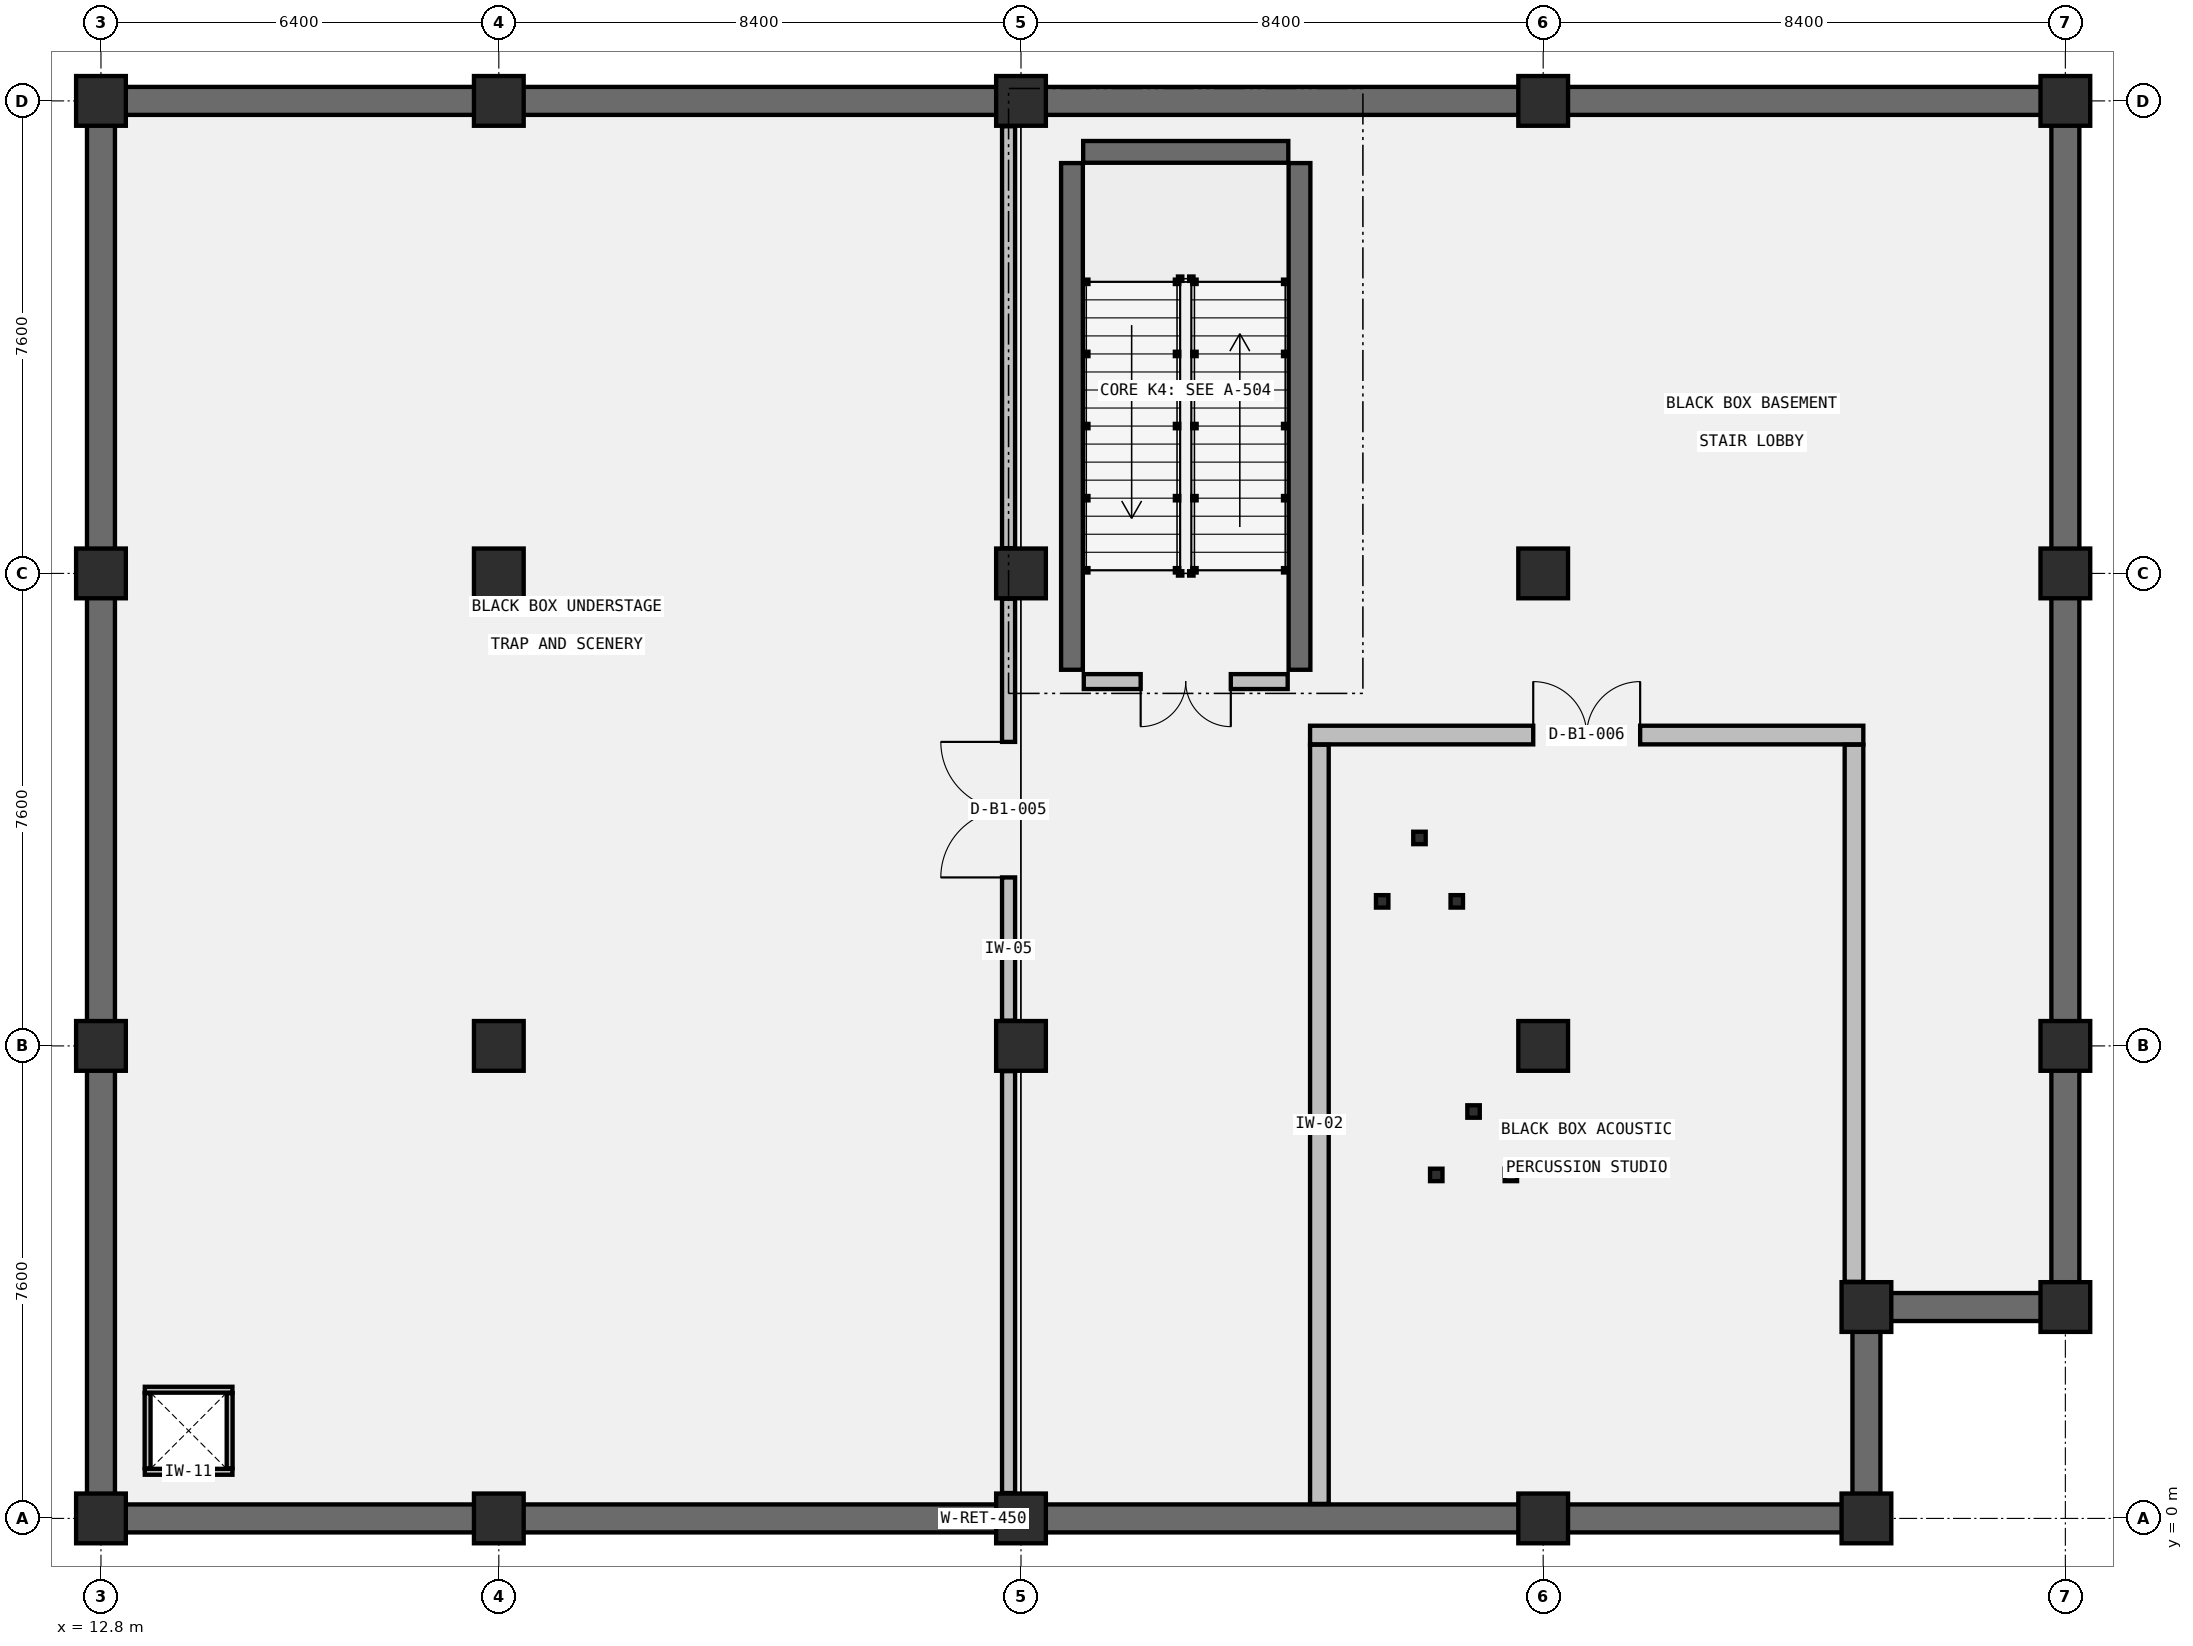
"""IFC4 building model, lengths in metres.
Left out: names, types, materials, properties, quantities, classifications, styles, units other than length and angle.
Written with IfcOpenShell. Run it as: python <this file> out.ifc"""

import sys

from ifc_helpers import new_model, si_unit, direction, frame, frame_2d, origin, origin_2d, place, context, subcontext, project, spatial, rectangle, i_section, extrude, element, fill, save


model = new_model("IFC4")
c1 = context("Model", 3, precision=1e-05, world=origin(), true_north=direction((0.0, 1.0)))
c2 = subcontext(c1, "Body", "Model", "MODEL_VIEW")
j1 = project(units=[si_unit("LENGTHUNIT", "METRE"), si_unit("PLANEANGLEUNIT", "RADIAN")], contexts=[c1])
p1 = place(None, origin())
s1 = spatial("IfcSite", under=j1, at=p1, CompositionType="ELEMENT")
p2 = place(p1, origin())
s2 = spatial("IfcBuilding", under=s1, at=p2, CompositionType="ELEMENT")
p3 = place(p2, frame((0.0, 0.0, -5.4)))
s3 = spatial("IfcBuildingStorey", under=s2, at=p3, CompositionType="ELEMENT", Elevation=-5.4)
for number, where, z_axis, x_axis in (
    (1, (12.8, 0.0, 0.0), (0.0, 0.0, 1.0), (1.0, 0.0, 0.0)),
    (2, (12.8, 7.6, 0.0), (0.0, 0.0, 1.0), (1.0, 0.0, 0.0)),
    (3, (12.8, 15.2, 0.0), (0.0, 0.0, 1.0), (1.0, 0.0, 0.0)),
    (4, (12.8, 22.8, 0.0), (0.0, 0.0, 1.0), (1.0, 0.0, 0.0)),
    (5, (19.2, 0.0, 0.0), (0.0, 0.0, 1.0), (1.0, 0.0, 0.0)),
    (6, (19.2, 7.6, 0.0), (0.0, 0.0, 1.0), (1.0, 0.0, 0.0)),
    (7, (19.2, 15.2, 0.0), (0.0, 0.0, 1.0), (1.0, 0.0, 0.0)),
    (8, (19.2, 22.8, 0.0), (0.0, 0.0, 1.0), (1.0, 0.0, 0.0)),
    (9, (27.6, 0.0, 0.0), (0.0, 0.0, 1.0), (1.0, 0.0, 0.0)),
    (10, (27.6, 7.6, 0.0), (0.0, 0.0, 1.0), (1.0, 0.0, 0.0)),
    (11, (27.6, 15.2, 0.0), (0.0, 0.0, 1.0), (1.0, 0.0, 0.0)),
    (12, (27.6, 22.8, 0.0), (0.0, 0.0, 1.0), (1.0, 0.0, 0.0)),
    (13, (36.0, 0.0, 0.0), (0.0, 0.0, 1.0), (1.0, 0.0, 0.0)),
    (14, (36.0, 7.6, 0.0), (0.0, 0.0, 1.0), (1.0, 0.0, 0.0)),
    (15, (36.0, 15.2, 0.0), (0.0, 0.0, 1.0), (1.0, 0.0, 0.0)),
    (16, (36.0, 22.8, 0.0), (0.0, 0.0, 1.0), (1.0, 0.0, 0.0)),
    (17, (44.4, 7.6, 0.0), (0.0, 0.0, 1.0), (1.0, 0.0, 0.0)),
    (18, (44.4, 15.2, 0.0), (0.0, 0.0, 1.0), (1.0, 0.0, 0.0)),
    (19, (44.4, 22.8, 0.0), (0.0, 0.0, 1.0), (1.0, 0.0, 0.0)),
    (20, (41.2, 0.0, 0.0), (0.0, 0.0, 1.0), (1.0, 0.0, 0.0)),
    (21, (41.2, 3.4, 0.0), (0.0, 0.0, 1.0), (1.0, 0.0, 0.0)),
    (22, (44.4, 3.4, 0.0), (0.0, 0.0, 1.0), (1.0, 0.0, 0.0)),
):
    element("IfcColumn", number, at=place(p3, frame(where, z_axis=z_axis, x_axis=x_axis)), inside=s3, PredefinedType="COLUMN", context=c2, shape_type="SweptSolid", body=[
        extrude(rectangle(XDim=0.8, YDim=0.8, at=origin_2d()), origin(), (0.0, 0.0, 1.0), 5.4),
    ])
p4 = place(p3, frame((13.1, 0.0, 0.0), z_axis=(0.0, 0.0, 1.0), x_axis=(1.0, 0.0, 0.0)))
e23 = element("IfcWall", 23, at=p4, inside=s3, PredefinedType="SHEAR", context=c2, shape_type="SweptSolid", body=[
    extrude(rectangle(XDim=27.8, YDim=0.45, at=frame_2d((13.9, 0.0))), origin(), (0.0, 0.0, 1.0), 5.1),
])
p5 = place(p3, frame((41.2, 0.3, 0.0), z_axis=(0.0, 0.0, 1.0), x_axis=(0.0, 1.0, 0.0)))
e24 = element("IfcWall", 24, at=p5, inside=s3, PredefinedType="SHEAR", context=c2, shape_type="SweptSolid", body=[
    extrude(rectangle(XDim=2.8, YDim=0.45, at=frame_2d((1.4, 0.0))), origin(), (0.0, 0.0, 1.0), 5.1),
])
p6 = place(p3, frame((41.5, 3.4, 0.0), z_axis=(0.0, 0.0, 1.0), x_axis=(1.0, 0.0, 0.0)))
e25 = element("IfcWall", 25, at=p6, inside=s3, PredefinedType="SHEAR", context=c2, shape_type="SweptSolid", body=[
    extrude(rectangle(XDim=2.6, YDim=0.45, at=frame_2d((1.3, 0.0))), origin(), (0.0, 0.0, 1.0), 5.1),
])
p7 = place(p3, frame((44.4, 3.7, 0.0), z_axis=(0.0, 0.0, 1.0), x_axis=(0.0, 1.0, 0.0)))
e26 = element("IfcWall", 26, at=p7, inside=s3, PredefinedType="SHEAR", context=c2, shape_type="SweptSolid", body=[
    extrude(rectangle(XDim=18.8, YDim=0.45, at=frame_2d((9.4, 0.0))), origin(), (0.0, 0.0, 1.0), 5.1),
])
p8 = place(p3, frame((44.1, 22.8, 0.0), z_axis=(0.0, 0.0, 1.0), x_axis=(-1.0, 0.0, 0.0)))
e27 = element("IfcWall", 27, at=p8, inside=s3, PredefinedType="SHEAR", context=c2, shape_type="SweptSolid", body=[
    extrude(rectangle(XDim=31.0, YDim=0.45, at=frame_2d((15.5, 0.0))), origin(), (0.0, 0.0, 1.0), 5.1),
])
p9 = place(p3, frame((12.8, 22.5, 0.0), z_axis=(0.0, 0.0, 1.0), x_axis=(0.0, -1.0, 0.0)))
e28 = element("IfcWall", 28, at=p9, inside=s3, PredefinedType="SHEAR", context=c2, shape_type="SweptSolid", body=[
    extrude(rectangle(XDim=22.2, YDim=0.45, at=frame_2d((11.1, 0.0))), origin(), (0.0, 0.0, 1.0), 5.1),
])
p10 = place(p3, frame((32.08, 13.65, 0.0), z_axis=(0.0, 0.0, 1.0), x_axis=(0.0, 1.0, 0.0)))
e29 = element("IfcWall", 29, at=p10, inside=s3, PredefinedType="SHEAR", context=c2, shape_type="SweptSolid", body=[
    extrude(rectangle(XDim=8.15, YDim=0.35, at=frame_2d((4.075, 0.0))), origin(), (0.0, 0.0, 1.0), 5.1),
])
p11 = place(p3, frame((31.9, 21.98, 0.0), z_axis=(0.0, 0.0, 1.0), x_axis=(-1.0, 0.0, 0.0)))
e30 = element("IfcWall", 30, at=p11, inside=s3, PredefinedType="SHEAR", context=c2, shape_type="SweptSolid", body=[
    extrude(rectangle(XDim=3.3, YDim=0.35, at=frame_2d((1.65, 0.0))), origin(), (0.0, 0.0, 1.0), 5.1),
])
p12 = place(p3, frame((28.42, 21.8, 0.0), z_axis=(0.0, 0.0, 1.0), x_axis=(0.0, -1.0, 0.0)))
e31 = element("IfcWall", 31, at=p12, inside=s3, PredefinedType="SHEAR", context=c2, shape_type="SweptSolid", body=[
    extrude(rectangle(XDim=8.15, YDim=0.35, at=frame_2d((4.075, 0.0))), origin(), (0.0, 0.0, 1.0), 5.1),
])
for number, where, z_axis, x_axis in (
    (32, (13.505, 0.75, 0.0), (0.0, 0.0, 1.0), (1.0, 0.0, 0.0)),
    (33, (13.505, 2.07, 0.0), (0.0, 0.0, 1.0), (1.0, 0.0, 0.0)),
):
    element("IfcWall", number, at=place(p3, frame(where, z_axis=z_axis, x_axis=x_axis)), inside=s3, PredefinedType="PARTITIONING", context=c2, shape_type="SweptSolid", body=[
        extrude(rectangle(XDim=1.41, YDim=0.095, at=frame_2d((0.705, 0.0))), origin(), (0.0, 0.0, 1.0), 5.1),
    ])
for number, where, z_axis, x_axis in (
    (34, (13.55, 0.805, 0.0), (0.0, 0.0, 1.0), (0.0, 1.0, 0.0)),
    (35, (14.87, 0.805, 0.0), (0.0, 0.0, 1.0), (0.0, 1.0, 0.0)),
):
    element("IfcWall", number, at=place(p3, frame(where, z_axis=z_axis, x_axis=x_axis)), inside=s3, PredefinedType="PARTITIONING", context=c2, shape_type="SweptSolid", body=[
        extrude(rectangle(XDim=1.21, YDim=0.095, at=frame_2d((0.605, 0.0))), origin(), (0.0, 0.0, 1.0), 5.1),
    ])
p13 = place(p3, frame((31.89, 13.46, 0.0), z_axis=(0.0, 0.0, 1.0), x_axis=(-1.0, 0.0, 0.0)))
e36 = element("IfcWall", 36, at=p13, inside=s3, PredefinedType="STANDARD", context=c2, shape_type="SweptSolid", body=[
    extrude(rectangle(XDim=3.28, YDim=0.24, at=frame_2d((1.64, 0.0))), origin(), (0.0, 0.0, 1.0), 5.1),
])
p14 = place(p13, frame((0.915, 0.0, 0.0)))
e37 = element("IfcOpeningElement", 37, at=p14, cuts=e36, PredefinedType="OPENING", context=c2, shape_type="SweptSolid", body=[
    extrude(rectangle(XDim=1.45, YDim=2.2, at=frame_2d((0.725, 1.1))), frame((0.0, 0.13, 0.0), z_axis=(0.0, -1.0, 0.0), x_axis=(1.0, 0.0, 0.0)), (0.0, 0.0, 1.0), 0.26),
])
for number, where, z_axis, x_axis in (
    (38, (34.28, 5.525, 0.0), (0.0, 0.0, 1.0), (1.0, 0.0, 0.0)),
    (39, (35.48, 5.525, 0.0), (0.0, 0.0, 1.0), (1.0, 0.0, 0.0)),
    (40, (34.88, 6.545, 0.0), (0.0, 0.0, 1.0), (1.0, 0.0, 0.0)),
    (41, (33.41, 9.925, 0.0), (0.0, 0.0, 1.0), (1.0, 0.0, 0.0)),
    (42, (34.61, 9.925, 0.0), (0.0, 0.0, 1.0), (1.0, 0.0, 0.0)),
    (43, (34.01, 10.945, 0.0), (0.0, 0.0, 1.0), (1.0, 0.0, 0.0)),
):
    element("IfcColumn", number, at=place(p3, frame(where, z_axis=z_axis, x_axis=x_axis)), inside=s3, PredefinedType="COLUMN", context=c2, shape_type="SweptSolid", body=[
        extrude(i_section(OverallWidth=0.2, OverallDepth=0.2, WebThickness=0.008, FlangeThickness=0.012, FilletRadius=0.013, at=origin_2d()), origin(), (0.0, 0.0, 1.0), 5.4),
    ])
p15 = place(p3, frame((27.4, 15.606, 0.0), z_axis=(0.0, 0.0, 1.0), x_axis=(0.0, 1.0, 0.0)))
e44 = element("IfcWall", 44, at=p15, inside=s3, PredefinedType="PARTITIONING", context=c2, shape_type="SweptSolid", body=[
    extrude(rectangle(XDim=6.786, YDim=0.21, at=frame_2d((3.393, 0.0))), origin(), (0.0, 0.0, 1.0), 4.45),
])
p16 = place(p3, frame((27.4, 8.006, 0.0), z_axis=(0.0, 0.0, 1.0), x_axis=(0.0, 1.0, 0.0)))
e45 = element("IfcWall", 45, at=p16, inside=s3, PredefinedType="PARTITIONING", context=c2, shape_type="SweptSolid", body=[
    extrude(rectangle(XDim=6.788, YDim=0.21, at=frame_2d((3.394, 0.0))), origin(), (0.0, 0.0, 1.0), 4.45),
])
p17 = place(p16, frame((2.304, 0.0, 0.0)))
e46 = element("IfcOpeningElement", 46, at=p17, cuts=e45, PredefinedType="OPENING", context=c2, shape_type="SweptSolid", body=[
    extrude(rectangle(XDim=2.18, YDim=2.58, at=frame_2d((1.09, 1.29))), frame((0.0, 0.115, 0.0), z_axis=(0.0, -1.0, 0.0), x_axis=(1.0, 0.0, 0.0)), (0.0, 0.0, 1.0), 0.23),
])
p18 = place(p3, frame((27.4, 0.408, 0.0), z_axis=(0.0, 0.0, 1.0), x_axis=(0.0, 1.0, 0.0)))
e47 = element("IfcWall", 47, at=p18, inside=s3, PredefinedType="PARTITIONING", context=c2, shape_type="SweptSolid", body=[
    extrude(rectangle(XDim=6.786, YDim=0.21, at=frame_2d((3.393, 0.0))), origin(), (0.0, 0.0, 1.0), 4.45),
])
p19 = place(p3, frame((32.25, 12.6, 0.0), z_axis=(0.0, 0.0, 1.0), x_axis=(1.0, 0.0, 0.0)))
e48 = element("IfcWall", 48, at=p19, inside=s3, PredefinedType="PARTITIONING", context=c2, shape_type="SweptSolid", body=[
    extrude(rectangle(XDim=8.9, YDim=0.3, at=frame_2d((4.45, 0.0))), origin(), (0.0, 0.0, 1.0), 4.438),
])
p20 = place(p19, frame((3.59, 0.0, 0.0)))
e49 = element("IfcOpeningElement", 49, at=p20, cuts=e48, PredefinedType="OPENING", context=c2, shape_type="SweptSolid", body=[
    extrude(rectangle(XDim=1.72, YDim=2.38, at=frame_2d((0.86, 1.19))), frame((0.0, 0.16, 0.0), z_axis=(0.0, -1.0, 0.0), x_axis=(1.0, 0.0, 0.0)), (0.0, 0.0, 1.0), 0.32),
])
p21 = place(p3, frame((41.0, 3.806, 0.0), z_axis=(0.0, 0.0, 1.0), x_axis=(0.0, 1.0, 0.0)))
e50 = element("IfcWall", 50, at=p21, inside=s3, PredefinedType="PARTITIONING", context=c2, shape_type="SweptSolid", body=[
    extrude(rectangle(XDim=8.638, YDim=0.3, at=frame_2d((4.319, 0.0))), origin(), (0.0, 0.0, 1.0), 4.238),
])
p22 = place(p3, frame((32.4, 0.233, 0.0), z_axis=(0.0, 0.0, 1.0), x_axis=(0.0, 1.0, 0.0)))
e51 = element("IfcWall", 51, at=p22, inside=s3, PredefinedType="PARTITIONING", context=c2, shape_type="SweptSolid", body=[
    extrude(rectangle(XDim=12.211, YDim=0.3, at=frame_2d((6.105, 0.0))), origin(), (0.0, 0.0, 1.0), 4.238),
])
p23 = place(p14, origin())
e52 = element("IfcDoor", 52, at=p23, inside=s3, OperationType="DOUBLE_DOOR_SINGLE_SWING", PredefinedType="DOOR", context=c2, shape_type="SweptSolid", body=[
    extrude(rectangle(XDim=1.45, YDim=2.2, at=frame_2d((0.725, 1.1))), frame((0.0, 0.025, 0.0), z_axis=(0.0, -1.0, 0.0), x_axis=(1.0, 0.0, 0.0)), (0.0, 0.0, 1.0), 0.05),
])
fill(e37, e52)
p24 = place(p17, origin())
e53 = element("IfcDoor", 53, at=p24, inside=s3, OperationType="DOUBLE_DOOR_SINGLE_SWING", PredefinedType="DOOR", context=c2, shape_type="SweptSolid", body=[
    extrude(rectangle(XDim=2.18, YDim=2.58, at=frame_2d((1.09, 1.29))), frame((0.0, 0.025, 0.0), z_axis=(0.0, -1.0, 0.0), x_axis=(1.0, 0.0, 0.0)), (0.0, 0.0, 1.0), 0.05),
])
fill(e46, e53)
p25 = place(p20, origin())
e54 = element("IfcDoor", 54, at=p25, inside=s3, OperationType="DOUBLE_DOOR_SINGLE_SWING", PredefinedType="DOOR", context=c2, shape_type="SweptSolid", body=[
    extrude(rectangle(XDim=1.72, YDim=2.38, at=frame_2d((0.86, 1.19))), frame((0.0, 0.025, 0.0), z_axis=(0.0, -1.0, 0.0), x_axis=(1.0, 0.0, 0.0)), (0.0, 0.0, 1.0), 0.05),
])
fill(e49, e54)
save(model, sys.argv[1])
